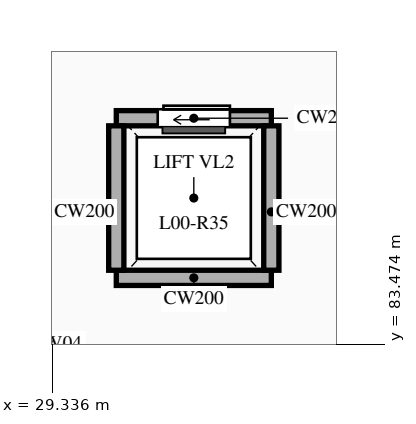
"""IFC4 building model, lengths in metres.
Left out: names, types, materials, properties, quantities, classifications, styles, units other than length and angle.
Written with IfcOpenShell. Run it as: python <this file> out.ifc"""

import sys

from ifc_helpers import new_model, si_unit, direction, frame, frame_2d, origin, place, context, subcontext, project, spatial, rectangle, extrude, element, fill, save


model = new_model("IFC4")
c1 = context("Model", 3, precision=1e-05, world=origin(), true_north=direction((0.0, 1.0)))
c2 = subcontext(c1, "Body", "Model", "MODEL_VIEW")
j1 = project(units=[si_unit("LENGTHUNIT", "METRE"), si_unit("PLANEANGLEUNIT", "RADIAN")], contexts=[c1])
p1 = place(None, origin())
s1 = spatial("IfcSite", under=j1, at=p1, CompositionType="ELEMENT")
p2 = place(p1, origin())
s2 = spatial("IfcBuilding", under=s1, at=p2, CompositionType="ELEMENT")
p3 = place(p2, origin())
s3 = spatial("IfcBuildingStorey", under=s2, at=p3, CompositionType="ELEMENT", Elevation=0.0)
p4 = place(p3, frame((30.18, 86.45, 0.0), z_axis=(0.0, 0.0, 1.0), x_axis=(1.0, 0.0, 0.0)))
e1 = element("IfcWall", 1, at=p4, inside=s3, PredefinedType="SOLIDWALL", context=c2, shape_type="SweptSolid", body=[
    extrude(rectangle(XDim=2.04, YDim=0.2, at=frame_2d((1.02, 0.0))), origin(), (0.0, 0.0, 1.0), 5.2),
])
p5 = place(p4, frame((0.545, 0.0, 0.0)))
e2 = element("IfcOpeningElement", 2, at=p5, cuts=e1, PredefinedType="OPENING", context=c2, shape_type="SweptSolid", body=[
    extrude(rectangle(XDim=0.95, YDim=2.15, at=frame_2d((0.475, 1.075))), frame((0.0, 0.11, 0.0), z_axis=(0.0, -1.0, 0.0), x_axis=(1.0, 0.0, 0.0)), (0.0, 0.0, 1.0), 0.22),
])
p6 = place(p3, frame((30.18, 84.35, 0.0), z_axis=(0.0, 0.0, 1.0), x_axis=(1.0, 0.0, 0.0)))
e3 = element("IfcWall", 3, at=p6, inside=s3, PredefinedType="SOLIDWALL", context=c2, shape_type="SweptSolid", body=[
    extrude(rectangle(XDim=2.04, YDim=0.2, at=frame_2d((1.02, 0.0))), origin(), (0.0, 0.0, 1.0), 5.2),
])
for number, where, z_axis, x_axis in (
    (4, (30.18, 84.45, 0.0), (0.0, 0.0, 1.0), (0.0, 1.0, 0.0)),
    (5, (32.22, 84.45, 0.0), (0.0, 0.0, 1.0), (0.0, 1.0, 0.0)),
):
    element("IfcWall", number, at=place(p3, frame(where, z_axis=z_axis, x_axis=x_axis)), inside=s3, PredefinedType="SOLIDWALL", context=c2, shape_type="SweptSolid", body=[
        extrude(rectangle(XDim=1.9, YDim=0.2, at=frame_2d((0.95, 0.0))), origin(), (0.0, 0.0, 1.0), 5.2),
    ])
p7 = place(p5, origin())
e6 = element("IfcDoor", 6, at=p7, inside=s3, OperationType="SLIDING_TO_LEFT", PredefinedType="DOOR", context=c2, shape_type="SweptSolid", body=[
    extrude(rectangle(XDim=0.95, YDim=2.15, at=frame_2d((0.475, 1.075))), frame((0.0, 0.025, 0.0), z_axis=(0.0, -1.0, 0.0), x_axis=(1.0, 0.0, 0.0)), (0.0, 0.0, 1.0), 0.05),
])
fill(e2, e6)
save(model, sys.argv[1])
